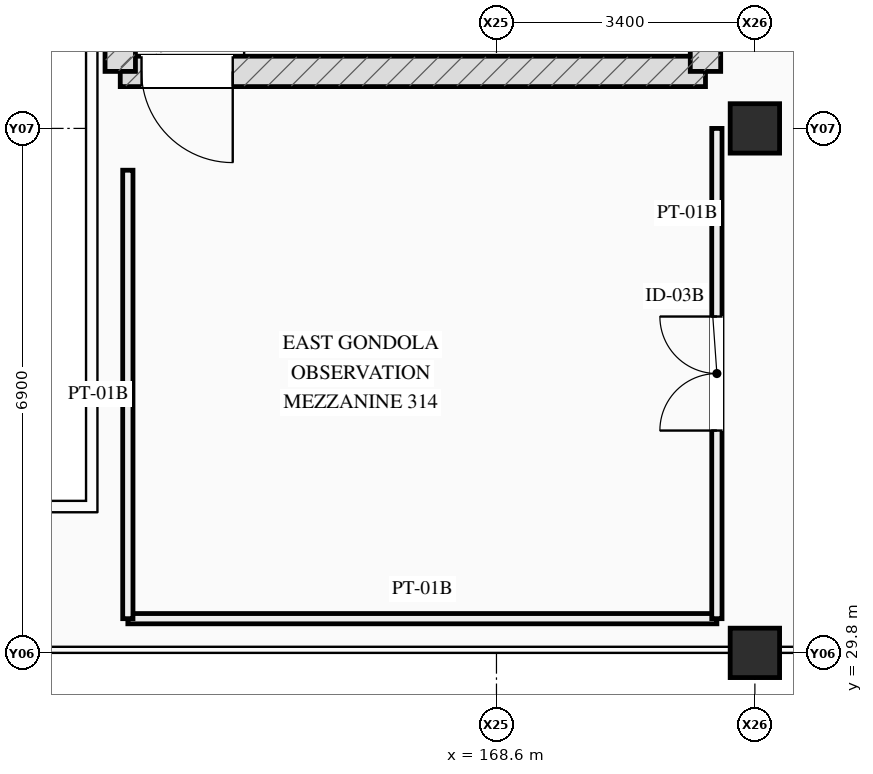
"""IFC4 building model, lengths in metres.
Left out: names, types, materials, properties, quantities, classifications, styles, units other than length and angle.
Written with IfcOpenShell. Run it as: python <this file> out.ifc"""

import sys

from ifc_helpers import new_model, si_unit, direction, frame, frame_2d, origin, origin_2d, place, context, subcontext, project, spatial, rectangle, extrude, element, fill, save


model = new_model("IFC4")
c1 = context("Model", 3, precision=1e-05, world=origin(), true_north=direction((0.0, 1.0)))
c2 = subcontext(c1, "Body", "Model", "MODEL_VIEW")
j1 = project(units=[si_unit("LENGTHUNIT", "METRE"), si_unit("PLANEANGLEUNIT", "RADIAN")], contexts=[c1])
p1 = place(None, origin())
s1 = spatial("IfcSite", under=j1, at=p1, CompositionType="ELEMENT")
p2 = place(p1, origin())
s2 = spatial("IfcBuilding", under=s1, at=p2, CompositionType="ELEMENT")
p3 = place(p2, frame((0.0, 0.0, 14.4)))
s3 = spatial("IfcBuildingStorey", under=s2, at=p3, CompositionType="ELEMENT", Elevation=14.4)
for number, where, z_axis, x_axis in (
    (1, (172.0, 29.8, 0.0), (0.0, 0.0, 1.0), (1.0, 0.0, 0.0)),
    (2, (172.0, 36.7, 0.0), (0.0, 0.0, 1.0), (1.0, 0.0, 0.0)),
):
    element("IfcColumn", number, at=place(p3, frame(where, z_axis=z_axis, x_axis=x_axis)), inside=s3, PredefinedType="COLUMN", context=c2, shape_type="SweptSolid", body=[
        extrude(rectangle(XDim=0.65, YDim=0.65, at=origin_2d()), origin(), (0.0, 0.0, 1.0), 4.2),
    ])
p4 = place(p3, frame((163.65, 37.45, 0.0), z_axis=(0.0, 0.0, 1.0), x_axis=(1.0, 0.0, 0.0)))
e3 = element("IfcWall", 3, at=p4, inside=s3, PredefinedType="SHEAR", context=c2, shape_type="SweptSolid", body=[
    extrude(rectangle(XDim=7.7, YDim=0.4, at=frame_2d((3.85, 0.0))), origin(), (0.0, 0.0, 1.0), 3.99),
])
p5 = place(p4, frame((0.28, 0.0, 0.0)))
e4 = element("IfcOpeningElement", 4, at=p5, cuts=e3, PredefinedType="OPENING", context=c2, shape_type="SweptSolid", body=[
    extrude(rectangle(XDim=1.2, YDim=2.2, at=frame_2d((0.6, 1.1))), frame((0.0, 0.21, 0.0), z_axis=(0.0, -1.0, 0.0), x_axis=(1.0, 0.0, 0.0)), (0.0, 0.0, 1.0), 0.42),
])
for number, where, z_axis, x_axis in (
    (5, (163.65, 41.1, 0.0), (0.0, 0.0, 1.0), (0.0, -1.0, 0.0)),
    (6, (171.35, 37.45, 0.0), (0.0, 0.0, 1.0), (0.0, 1.0, 0.0)),
):
    element("IfcWall", number, at=place(p3, frame(where, z_axis=z_axis, x_axis=x_axis)), inside=s3, PredefinedType="SHEAR", context=c2, shape_type="SweptSolid", body=[
        extrude(rectangle(XDim=3.65, YDim=0.4, at=frame_2d((1.825, 0.0))), origin(), (0.0, 0.0, 1.0), 3.99),
    ])
p6 = place(p3, frame((163.75, 30.25, 0.0), z_axis=(0.0, 0.0, 1.0), x_axis=(1.0, 0.0, 0.0)))
e7 = element("IfcWall", 7, at=p6, inside=s3, PredefinedType="PARTITIONING", context=c2, shape_type="SweptSolid", body=[
    extrude(rectangle(XDim=7.75, YDim=0.135, at=frame_2d((3.875, 0.0))), origin(), (0.0, 0.0, 1.0), 3.05),
])
p7 = place(p3, frame((163.75, 30.25, 0.0), z_axis=(0.0, 0.0, 1.0), x_axis=(0.0, 1.0, 0.0)))
e8 = element("IfcWall", 8, at=p7, inside=s3, PredefinedType="PARTITIONING", context=c2, shape_type="SweptSolid", body=[
    extrude(rectangle(XDim=5.9, YDim=0.135, at=frame_2d((2.95, 0.0))), origin(), (0.0, 0.0, 1.0), 3.05),
])
p8 = place(p3, frame((171.5, 30.25, 0.0), z_axis=(0.0, 0.0, 1.0), x_axis=(0.0, 1.0, 0.0)))
e9 = element("IfcWall", 9, at=p8, inside=s3, PredefinedType="PARTITIONING", context=c2, shape_type="SweptSolid", body=[
    extrude(rectangle(XDim=6.45, YDim=0.135, at=frame_2d((3.225, 0.0))), origin(), (0.0, 0.0, 1.0), 3.05),
])
p9 = place(p8, frame((2.475, 0.0, 0.0)))
e10 = element("IfcOpeningElement", 10, at=p9, cuts=e9, PredefinedType="OPENING", context=c2, shape_type="SweptSolid", body=[
    extrude(rectangle(XDim=1.5, YDim=2.2, at=frame_2d((0.75, 1.1))), frame((0.0, 0.077, 0.0), z_axis=(0.0, -1.0, 0.0), x_axis=(1.0, 0.0, 0.0)), (0.0, 0.0, 1.0), 0.155),
])
p10 = place(p5, origin())
e11 = element("IfcDoor", 11, at=p10, inside=s3, OperationType="SINGLE_SWING_RIGHT", PredefinedType="DOOR", context=c2, shape_type="SweptSolid", body=[
    extrude(rectangle(XDim=1.2, YDim=2.2, at=frame_2d((0.6, 1.1))), frame((0.0, 0.025, 0.0), z_axis=(0.0, -1.0, 0.0), x_axis=(1.0, 0.0, 0.0)), (0.0, 0.0, 1.0), 0.05),
])
fill(e4, e11)
p11 = place(p9, origin())
e12 = element("IfcDoor", 12, at=p11, inside=s3, OperationType="DOUBLE_DOOR_SINGLE_SWING", PredefinedType="DOOR", context=c2, shape_type="SweptSolid", body=[
    extrude(rectangle(XDim=1.5, YDim=2.2, at=frame_2d((0.75, 1.1))), frame((0.0, 0.025, 0.0), z_axis=(0.0, -1.0, 0.0), x_axis=(1.0, 0.0, 0.0)), (0.0, 0.0, 1.0), 0.05),
])
fill(e10, e12)
save(model, sys.argv[1])
